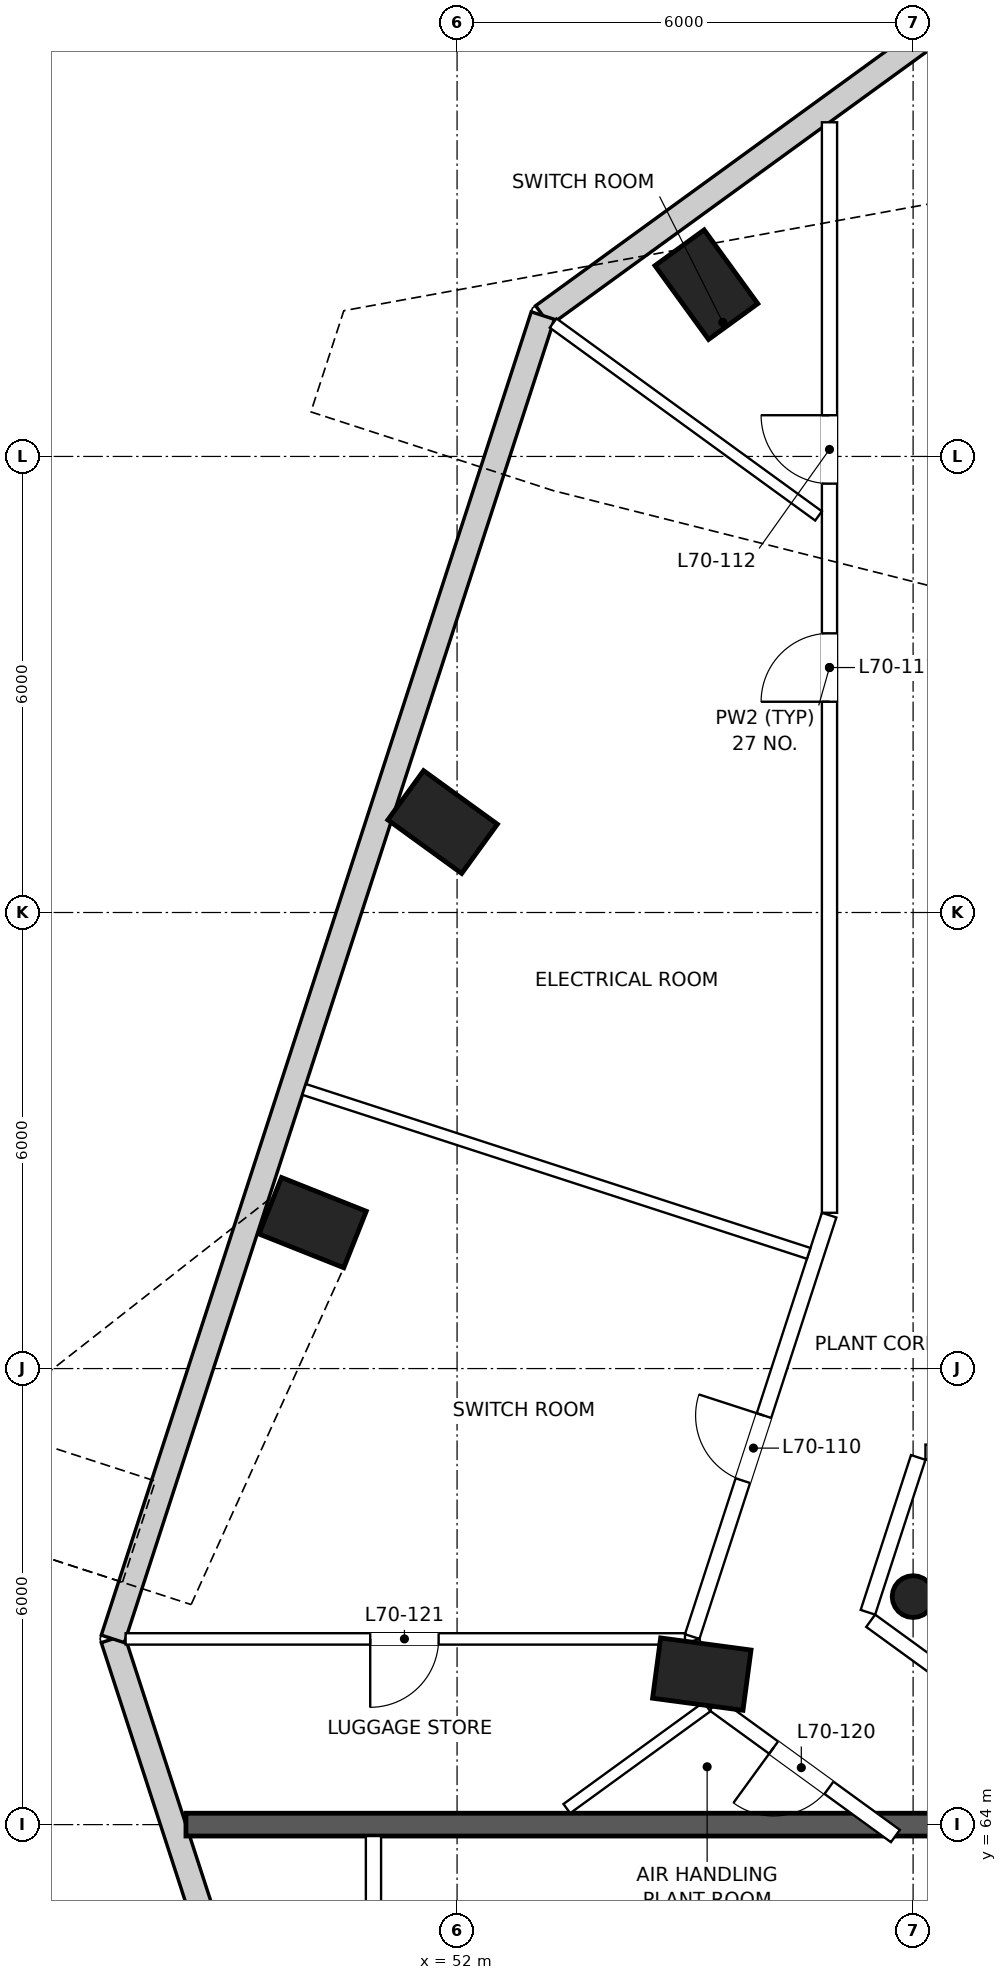
"""IFC4 building model, lengths in metres.
Left out: names, types, materials, properties, quantities, classifications, styles, units other than length and angle.
Written with IfcOpenShell. Run it as: python <this file> out.ifc"""

import sys

from ifc_helpers import new_model, si_unit, direction, frame, frame_2d, origin, origin_2d, place, context, subcontext, project, spatial, rectangle, circle, extrude, element, fill, save


model = new_model("IFC4")
c1 = context("Model", 3, precision=1e-05, world=origin(), true_north=direction((0.0, 1.0)))
c2 = subcontext(c1, "Body", "Model", "MODEL_VIEW")
j1 = project(units=[si_unit("LENGTHUNIT", "METRE"), si_unit("PLANEANGLEUNIT", "RADIAN")], contexts=[c1])
p1 = place(None, origin())
s1 = spatial("IfcSite", under=j1, at=p1, CompositionType="ELEMENT")
p2 = place(p1, origin())
s2 = spatial("IfcBuilding", under=s1, at=p2, CompositionType="ELEMENT")
p3 = place(p2, frame((0.0, 0.0, 295.1)))
s3 = spatial("IfcBuildingStorey", under=s2, at=p3, CompositionType="ELEMENT", Elevation=295.1)
for number, where, z_axis, x_axis in (
    (1, (55.28, 84.26, 0.0), (0.0, 0.0, 1.0), (0.809, 0.588, 0.0)),
    (2, (51.81, 77.19, 0.0), (0.0, 0.0, 1.0), (0.587, 0.81, 0.0)),
    (3, (50.1, 71.92, 0.0), (0.0, 0.0, 1.0), (0.37, 0.929, 0.0)),
    (4, (55.22, 65.98, 0.0), (0.0, 0.0, 1.0), (0.133, 0.991, 0.0)),
):
    element("IfcColumn", number, at=place(p3, frame(where, z_axis=z_axis, x_axis=x_axis)), inside=s3, PredefinedType="COLUMN", context=c2, shape_type="SweptSolid", body=[
        extrude(rectangle(XDim=0.8, YDim=1.2, at=origin_2d()), origin(), (0.0, 0.0, 1.0), 5.0),
    ])
p4 = place(p3, frame((58.0, 67.0, 0.0), z_axis=(0.0, 0.0, 1.0), x_axis=(1.0, 0.0, 0.0)))
e5 = element("IfcColumn", 5, at=p4, inside=s3, PredefinedType="COLUMN", context=c2, shape_type="SweptSolid", body=[
    extrude(circle(Radius=0.275, at=origin_2d()), origin(), (0.0, 0.0, 1.0), 5.0),
])
p5 = place(p3, frame((47.471, 66.443, 0.0), z_axis=(0.0, 0.0, 1.0), x_axis=(0.309039663735, -0.951049150275, 0.0)))
e6 = element("IfcWall", 6, at=p5, inside=s3, PredefinedType="SOLIDWALL", context=c2, shape_type="SweptSolid", body=[
    extrude(rectangle(XDim=5.591, YDim=0.32, at=frame_2d((2.795, 0.0))), origin(), (0.0, 0.0, 1.0), 4.6),
])
p6 = place(p3, frame((58.615, 87.84, 0.0), z_axis=(0.0, 0.0, 1.0), x_axis=(-0.809017735842, -0.587784231749, 0.0)))
e7 = element("IfcWall", 7, at=p6, inside=s3, PredefinedType="SOLIDWALL", context=c2, shape_type="SweptSolid", body=[
    extrude(rectangle(XDim=6.782, YDim=0.32, at=frame_2d((3.391, 0.0))), origin(), (0.0, 0.0, 1.0), 4.6),
])
p7 = place(p3, frame((53.128, 83.854, 0.0), z_axis=(0.0, 0.0, 1.0), x_axis=(-0.30902093442, -0.951055236088, 0.0)))
e8 = element("IfcWall", 8, at=p7, inside=s3, PredefinedType="SOLIDWALL", context=c2, shape_type="SweptSolid", body=[
    extrude(rectangle(XDim=18.306, YDim=0.32, at=frame_2d((9.153, 0.0))), origin(), (0.0, 0.0, 1.0), 4.6),
])
p8 = place(p3, frame((48.433, 64.0, 0.0), z_axis=(0.0, 0.0, 1.0), x_axis=(1.0, 0.0, 0.0)))
e9 = element("IfcWall", 9, at=p8, inside=s3, PredefinedType="PARTITIONING", context=c2, shape_type="SweptSolid", body=[
    extrude(rectangle(XDim=43.134, YDim=0.3, at=frame_2d((21.567, 0.0))), origin(), (0.0, 0.0, 1.0), 3.9),
])
p9 = place(p8, frame((10.314, 0.0, 0.0)))
e10 = element("IfcOpeningElement", 10, at=p9, cuts=e9, PredefinedType="OPENING", context=c2, shape_type="SweptSolid", body=[
    extrude(rectangle(XDim=1.2, YDim=2.1, at=frame_2d((0.6, 1.05))), frame((0.0, 0.16, 0.0), z_axis=(0.0, -1.0, 0.0), x_axis=(1.0, 0.0, 0.0)), (0.0, 0.0, 1.0), 0.32),
])
p10 = place(p8, frame((20.967, 0.0, 0.0)))
e11 = element("IfcOpeningElement", 11, at=p10, cuts=e9, PredefinedType="OPENING", context=c2, shape_type="SweptSolid", body=[
    extrude(rectangle(XDim=1.2, YDim=2.1, at=frame_2d((0.6, 1.05))), frame((0.0, 0.16, 0.0), z_axis=(0.0, -1.0, 0.0), x_axis=(1.0, 0.0, 0.0)), (0.0, 0.0, 1.0), 0.32),
])
p11 = place(p8, frame((31.62, 0.0, 0.0)))
e12 = element("IfcOpeningElement", 12, at=p11, cuts=e9, PredefinedType="OPENING", context=c2, shape_type="SweptSolid", body=[
    extrude(rectangle(XDim=1.2, YDim=2.1, at=frame_2d((0.6, 1.05))), frame((0.0, 0.16, 0.0), z_axis=(0.0, -1.0, 0.0), x_axis=(1.0, 0.0, 0.0)), (0.0, 0.0, 1.0), 0.32),
])
p12 = place(p3, frame((50.9, 60.088, 0.0), z_axis=(0.0, 0.0, 1.0), x_axis=(0.0, 1.0, 0.0)))
e13 = element("IfcWall", 13, at=p12, inside=s3, PredefinedType="PARTITIONING", context=c2, shape_type="SweptSolid", body=[
    extrude(rectangle(XDim=3.762, YDim=0.2, at=frame_2d((1.881, 0.0))), origin(), (0.0, 0.0, 1.0), 4.6),
])
p13 = place(p3, frame((57.767, 63.85, 0.0), z_axis=(0.0, 0.0, 1.0), x_axis=(-0.809065647846, 0.587718280705, 0.0)))
e14 = element("IfcWall", 14, at=p13, inside=s3, PredefinedType="PARTITIONING", context=c2, shape_type="SweptSolid", body=[
    extrude(rectangle(XDim=2.946, YDim=0.2, at=frame_2d((1.473, 0.0))), origin(), (0.0, 0.0, 1.0), 3.6),
])
p14 = place(p13, frame((1.08, 0.0, 0.0)))
e15 = element("IfcOpeningElement", 15, at=p14, cuts=e14, PredefinedType="OPENING", context=c2, shape_type="SweptSolid", body=[
    extrude(rectangle(XDim=0.9, YDim=2.1, at=frame_2d((0.45, 1.05))), frame((0.0, 0.11, 0.0), z_axis=(0.0, -1.0, 0.0), x_axis=(1.0, 0.0, 0.0)), (0.0, 0.0, 1.0), 0.22),
])
p15 = place(p3, frame((55.347, 65.632, 0.0), z_axis=(0.0, 0.0, 1.0), x_axis=(-0.309260889552, 0.950977235371, 0.0)))
e16 = element("IfcWall", 16, at=p15, inside=s3, PredefinedType="PARTITIONING", context=c2, shape_type="SweptSolid", body=[
    extrude(rectangle(XDim=0.821, YDim=0.2, at=frame_2d((0.411, 0.0))), origin(), (0.0, 0.0, 1.0), 3.6),
])
p16 = place(p3, frame((55.094, 66.474, 0.0), z_axis=(0.0, 0.0, 1.0), x_axis=(0.30901978602, 0.95105560923, 0.0)))
e17 = element("IfcWall", 17, at=p16, inside=s3, PredefinedType="PARTITIONING", context=c2, shape_type="SweptSolid", body=[
    extrude(rectangle(XDim=5.83, YDim=0.2, at=frame_2d((2.915, 0.0))), origin(), (0.0, 0.0, 1.0), 4.6),
])
p17 = place(p16, frame((2.157, 0.0, 0.0)))
e18 = element("IfcOpeningElement", 18, at=p17, cuts=e17, PredefinedType="OPENING", context=c2, shape_type="SweptSolid", body=[
    extrude(rectangle(XDim=0.9, YDim=2.1, at=frame_2d((0.45, 1.05))), frame((0.0, 0.11, 0.0), z_axis=(0.0, -1.0, 0.0), x_axis=(1.0, 0.0, 0.0)), (0.0, 0.0, 1.0), 0.22),
])
p18 = place(p3, frame((56.9, 72.05, 0.0), z_axis=(0.0, 0.0, 1.0), x_axis=(0.0, 1.0, 0.0)))
e19 = element("IfcWall", 19, at=p18, inside=s3, PredefinedType="PARTITIONING", context=c2, shape_type="SweptSolid", body=[
    extrude(rectangle(XDim=14.347, YDim=0.2, at=frame_2d((7.173, 0.0))), origin(), (0.0, 0.0, 1.0), 4.15),
])
p19 = place(p18, frame((6.723, 0.0, 0.0)))
e20 = element("IfcOpeningElement", 20, at=p19, cuts=e19, PredefinedType="OPENING", context=c2, shape_type="SweptSolid", body=[
    extrude(rectangle(XDim=0.9, YDim=2.1, at=frame_2d((0.45, 1.05))), frame((0.0, 0.11, 0.0), z_axis=(0.0, -1.0, 0.0), x_axis=(1.0, 0.0, 0.0)), (0.0, 0.0, 1.0), 0.22),
])
p20 = place(p18, frame((9.593, 0.0, 0.0)))
e21 = element("IfcOpeningElement", 21, at=p20, cuts=e19, PredefinedType="OPENING", context=c2, shape_type="SweptSolid", body=[
    extrude(rectangle(XDim=0.9, YDim=2.1, at=frame_2d((0.45, 1.05))), frame((0.0, 0.11, 0.0), z_axis=(0.0, -1.0, 0.0), x_axis=(1.0, 0.0, 0.0)), (0.0, 0.0, 1.0), 0.22),
])
p21 = place(p3, frame((68.85, 68.9, 0.0), z_axis=(0.0, 0.0, 1.0), x_axis=(-1.0, 0.0, 0.0)))
e22 = element("IfcWall", 22, at=p21, inside=s3, PredefinedType="PARTITIONING", context=c2, shape_type="SweptSolid", body=[
    extrude(rectangle(XDim=10.688, YDim=0.2, at=frame_2d((5.344, 0.0))), origin(), (0.0, 0.0, 1.0), 4.6),
])
p22 = place(p21, frame((7.681, 0.0, 0.0)))
e23 = element("IfcOpeningElement", 23, at=p22, cuts=e22, PredefinedType="OPENING", context=c2, shape_type="SweptSolid", body=[
    extrude(rectangle(XDim=0.9, YDim=2.1, at=frame_2d((0.45, 1.05))), frame((0.0, 0.11, 0.0), z_axis=(0.0, -1.0, 0.0), x_axis=(1.0, 0.0, 0.0)), (0.0, 0.0, 1.0), 0.22),
])
p23 = place(p3, frame((58.067, 68.831, 0.0), z_axis=(0.0, 0.0, 1.0), x_axis=(-0.309003597347, -0.951060869149, 0.0)))
e24 = element("IfcWall", 24, at=p23, inside=s3, PredefinedType="PARTITIONING", context=c2, shape_type="SweptSolid", body=[
    extrude(rectangle(XDim=2.142, YDim=0.2, at=frame_2d((1.071, 0.0))), origin(), (0.0, 0.0, 1.0), 4.6),
])
p24 = place(p3, frame((57.442, 66.682, 0.0), z_axis=(0.0, 0.0, 1.0), x_axis=(0.809027628487, -0.587770615414, 0.0)))
e25 = element("IfcWall", 25, at=p24, inside=s3, PredefinedType="PARTITIONING", context=c2, shape_type="SweptSolid", body=[
    extrude(rectangle(XDim=4.308, YDim=0.2, at=frame_2d((2.154, 0.0))), origin(), (0.0, 0.0, 1.0), 3.6),
])
p25 = place(p3, frame((53.264, 83.754, 0.0), z_axis=(0.0, 0.0, 1.0), x_axis=(0.809036838554, -0.587757938154, 0.0)))
e26 = element("IfcWall", 26, at=p25, inside=s3, PredefinedType="PARTITIONING", context=c2, shape_type="SweptSolid", body=[
    extrude(rectangle(XDim=4.316, YDim=0.15, at=frame_2d((2.158, 0.0))), origin(), (0.0, 0.0, 1.0), 4.6),
])
p26 = place(p3, frame((47.639, 66.443, 0.0), z_axis=(0.0, 0.0, 1.0), x_axis=(1.0, 0.0, 0.0)))
e27 = element("IfcWall", 27, at=p26, inside=s3, PredefinedType="PARTITIONING", context=c2, shape_type="SweptSolid", body=[
    extrude(rectangle(XDim=7.359, YDim=0.15, at=frame_2d((3.68, 0.0))), origin(), (0.0, 0.0, 1.0), 3.6),
])
p27 = place(p26, frame((3.218, 0.0, 0.0)))
e28 = element("IfcOpeningElement", 28, at=p27, cuts=e27, PredefinedType="OPENING", context=c2, shape_type="SweptSolid", body=[
    extrude(rectangle(XDim=0.9, YDim=2.1, at=frame_2d((0.45, 1.05))), frame((0.0, 0.085, 0.0), z_axis=(0.0, -1.0, 0.0), x_axis=(1.0, 0.0, 0.0)), (0.0, 0.0, 1.0), 0.17),
])
p28 = place(p3, frame((53.444, 64.211, 0.0), z_axis=(0.0, 0.0, 1.0), x_axis=(0.809018460862, 0.587783233841, 0.0)))
e29 = element("IfcWall", 29, at=p28, inside=s3, PredefinedType="PARTITIONING", context=c2, shape_type="SweptSolid", body=[
    extrude(rectangle(XDim=2.28, YDim=0.15, at=frame_2d((1.14, 0.0))), origin(), (0.0, 0.0, 1.0), 4.6),
])
p29 = place(p3, frame((49.988, 73.672, 0.0), z_axis=(0.0, 0.0, 1.0), x_axis=(0.951055400562, -0.309020428229, 0.0)))
e30 = element("IfcWall", 30, at=p29, inside=s3, PredefinedType="PARTITIONING", context=c2, shape_type="SweptSolid", body=[
    extrude(rectangle(XDim=6.98, YDim=0.15, at=frame_2d((3.49, 0.0))), origin(), (0.0, 0.0, 1.0), 4.15),
])
p30 = place(p17, origin())
e31 = element("IfcDoor", 31, at=p30, inside=s3, OperationType="SINGLE_SWING_RIGHT", PredefinedType="DOOR", context=c2, shape_type="SweptSolid", body=[
    extrude(rectangle(XDim=0.9, YDim=2.1, at=frame_2d((0.45, 1.05))), frame((0.0, 0.025, 0.0), z_axis=(0.0, -1.0, 0.0), x_axis=(1.0, 0.0, 0.0)), (0.0, 0.0, 1.0), 0.05),
])
fill(e18, e31)
p31 = place(p19, origin())
e32 = element("IfcDoor", 32, at=p31, inside=s3, OperationType="SINGLE_SWING_LEFT", PredefinedType="DOOR", context=c2, shape_type="SweptSolid", body=[
    extrude(rectangle(XDim=0.9, YDim=2.1, at=frame_2d((0.45, 1.05))), frame((0.0, 0.025, 0.0), z_axis=(0.0, -1.0, 0.0), x_axis=(1.0, 0.0, 0.0)), (0.0, 0.0, 1.0), 0.05),
])
fill(e20, e32)
p32 = place(p20, origin())
e33 = element("IfcDoor", 33, at=p32, inside=s3, OperationType="SINGLE_SWING_RIGHT", PredefinedType="DOOR", context=c2, shape_type="SweptSolid", body=[
    extrude(rectangle(XDim=0.9, YDim=2.1, at=frame_2d((0.45, 1.05))), frame((0.0, 0.025, 0.0), z_axis=(0.0, -1.0, 0.0), x_axis=(1.0, 0.0, 0.0)), (0.0, 0.0, 1.0), 0.05),
])
fill(e21, e33)
p33 = place(p14, origin())
e34 = element("IfcDoor", 34, at=p33, inside=s3, OperationType="SINGLE_SWING_RIGHT", PredefinedType="DOOR", context=c2, shape_type="SweptSolid", body=[
    extrude(rectangle(XDim=0.9, YDim=2.1, at=frame_2d((0.45, 1.05))), frame((0.0, 0.025, 0.0), z_axis=(0.0, -1.0, 0.0), x_axis=(1.0, 0.0, 0.0)), (0.0, 0.0, 1.0), 0.05),
])
fill(e15, e34)
p34 = place(p27, frame((0.9, 0.0, 0.0), z_axis=(0.0, 0.0, 1.0), x_axis=(-1.0, 0.0, 0.0)))
e35 = element("IfcDoor", 35, at=p34, inside=s3, OperationType="SINGLE_SWING_RIGHT", PredefinedType="DOOR", context=c2, shape_type="SweptSolid", body=[
    extrude(rectangle(XDim=0.9, YDim=2.1, at=frame_2d((0.45, 1.05))), frame((0.0, 0.025, 0.0), z_axis=(0.0, -1.0, 0.0), x_axis=(1.0, 0.0, 0.0)), (0.0, 0.0, 1.0), 0.05),
])
fill(e28, e35)
save(model, sys.argv[1])
